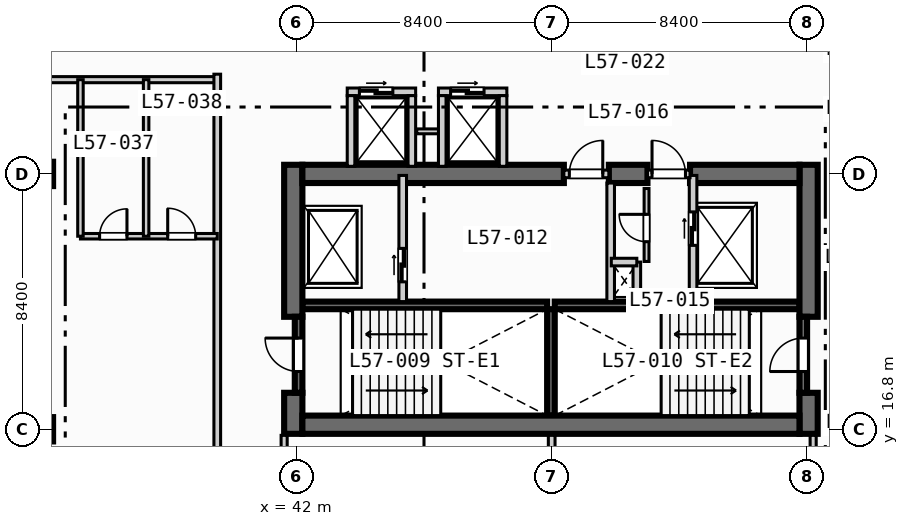
"""IFC4 building model, lengths in metres.
Left out: names, types, materials, properties, quantities, classifications, styles, units other than length and angle.
Written with IfcOpenShell. Run it as: python <this file> out.ifc"""

import sys

from ifc_helpers import new_model, si_unit, direction, frame, frame_2d, origin, origin_2d, place, context, subcontext, project, spatial, rectangle, extrude, element, fill, save


model = new_model("IFC4")
c1 = context("Model", 3, precision=1e-05, world=origin(), true_north=direction((0.0, 1.0)))
c2 = subcontext(c1, "Body", "Model", "MODEL_VIEW")
j1 = project(units=[si_unit("LENGTHUNIT", "METRE"), si_unit("PLANEANGLEUNIT", "RADIAN")], contexts=[c1])
p1 = place(None, origin())
s1 = spatial("IfcSite", under=j1, at=p1, CompositionType="ELEMENT")
p2 = place(p1, origin())
s2 = spatial("IfcBuilding", under=s1, at=p2, CompositionType="ELEMENT")
p3 = place(p2, frame((0.0, 0.0, 234.2)))
s3 = spatial("IfcBuildingStorey", under=s2, at=p3, CompositionType="ELEMENT", Elevation=234.2)
for number, where, z_axis, x_axis in (
    (1, (42.2, 20.875, 0.0), (0.0, 0.0, 1.0), (1.0, 0.0, 0.0)),
    (2, (50.5, 20.875, 0.0), (0.0, 0.0, 1.0), (1.0, 0.0, 0.0)),
):
    element("IfcWall", number, at=place(p3, frame(where, z_axis=z_axis, x_axis=x_axis)), inside=s3, PredefinedType="SOLIDWALL", context=c2, shape_type="SweptSolid", body=[
        extrude(rectangle(XDim=8.05, YDim=0.25, at=frame_2d((4.025, 0.0))), origin(), (0.0, 0.0, 1.0), 3.47),
    ])
p4 = place(p3, frame((50.375, 17.25, 0.0), z_axis=(0.0, 0.0, 1.0), x_axis=(0.0, 1.0, 0.0)))
e3 = element("IfcWall", 3, at=p4, inside=s3, PredefinedType="SOLIDWALL", context=c2, shape_type="SweptSolid", body=[
    extrude(rectangle(XDim=3.5, YDim=0.25, at=frame_2d((1.75, 0.0))), origin(), (0.0, 0.0, 1.0), 3.47),
])
p5 = place(p3, frame((41.9, 16.65, 0.0), z_axis=(0.0, 0.0, 1.0), x_axis=(0.0, 1.0, 0.0)))
e4 = element("IfcWall", 4, at=p5, inside=s3, PredefinedType="SHEAR", context=c2, shape_type="SweptSolid", body=[
    extrude(rectangle(XDim=1.35, YDim=0.6, at=frame_2d((0.675, 0.0))), origin(), (0.0, 0.0, 1.0), 3.47),
])
p6 = place(p3, frame((41.9, 20.5, 0.0), z_axis=(0.0, 0.0, 1.0), x_axis=(0.0, 1.0, 0.0)))
e5 = element("IfcWall", 5, at=p6, inside=s3, PredefinedType="SHEAR", context=c2, shape_type="SweptSolid", body=[
    extrude(rectangle(XDim=5.0, YDim=0.6, at=frame_2d((2.5, 0.0))), origin(), (0.0, 0.0, 1.0), 3.47),
])
p7 = place(p3, frame((58.85, 16.65, 0.0), z_axis=(0.0, 0.0, 1.0), x_axis=(0.0, 1.0, 0.0)))
e6 = element("IfcWall", 6, at=p7, inside=s3, PredefinedType="SHEAR", context=c2, shape_type="SweptSolid", body=[
    extrude(rectangle(XDim=1.35, YDim=0.6, at=frame_2d((0.675, 0.0))), origin(), (0.0, 0.0, 1.0), 3.47),
])
p8 = place(p3, frame((58.85, 20.5, 0.0), z_axis=(0.0, 0.0, 1.0), x_axis=(0.0, 1.0, 0.0)))
e7 = element("IfcWall", 7, at=p8, inside=s3, PredefinedType="SHEAR", context=c2, shape_type="SweptSolid", body=[
    extrude(rectangle(XDim=5.0, YDim=0.6, at=frame_2d((2.5, 0.0))), origin(), (0.0, 0.0, 1.0), 3.47),
])
p9 = place(p3, frame((42.2, 16.95, 0.0), z_axis=(0.0, 0.0, 1.0), x_axis=(1.0, 0.0, 0.0)))
e8 = element("IfcWall", 8, at=p9, inside=s3, PredefinedType="SHEAR", context=c2, shape_type="SweptSolid", body=[
    extrude(rectangle(XDim=16.35, YDim=0.6, at=frame_2d((8.175, 0.0))), origin(), (0.0, 0.0, 1.0), 3.47),
])
p10 = place(p3, frame((42.2, 25.2, 0.0), z_axis=(0.0, 0.0, 1.0), x_axis=(1.0, 0.0, 0.0)))
e9 = element("IfcWall", 9, at=p10, inside=s3, PredefinedType="SHEAR", context=c2, shape_type="SweptSolid", body=[
    extrude(rectangle(XDim=8.6, YDim=0.6, at=frame_2d((4.3, 0.0))), origin(), (0.0, 0.0, 1.0), 3.47),
])
p11 = place(p3, frame((52.28, 25.2, 0.0), z_axis=(0.0, 0.0, 1.0), x_axis=(1.0, 0.0, 0.0)))
e10 = element("IfcWall", 10, at=p11, inside=s3, PredefinedType="SHEAR", context=c2, shape_type="SweptSolid", body=[
    extrude(rectangle(XDim=1.27, YDim=0.6, at=frame_2d((0.635, 0.0))), origin(), (0.0, 0.0, 1.0), 3.47),
])
p12 = place(p3, frame((54.95, 25.2, 0.0), z_axis=(0.0, 0.0, 1.0), x_axis=(1.0, 0.0, 0.0)))
e11 = element("IfcWall", 11, at=p12, inside=s3, PredefinedType="SHEAR", context=c2, shape_type="SweptSolid", body=[
    extrude(rectangle(XDim=3.6, YDim=0.6, at=frame_2d((1.8, 0.0))), origin(), (0.0, 0.0, 1.0), 3.47),
])
for number, where, z_axis, x_axis in (
    (12, (33.6, 16.8, 0.0), (0.0, 0.0, 1.0), (1.0, 0.0, 0.0)),
    (13, (33.6, 25.2, 0.0), (0.0, 0.0, 1.0), (1.0, 0.0, 0.0)),
):
    element("IfcColumn", number, at=place(p3, frame(where, z_axis=z_axis, x_axis=x_axis)), inside=s3, PredefinedType="COLUMN", context=c2, shape_type="SweptSolid", body=[
        extrude(rectangle(XDim=0.8, YDim=0.8, at=origin_2d()), origin(), (0.0, 0.0, 1.0), 3.7),
    ])
p13 = place(p3, frame((42.075, 18.0, 0.0), z_axis=(0.0, 0.0, 1.0), x_axis=(0.0, 1.0, 0.0)))
e14 = element("IfcWall", 14, at=p13, inside=s3, PredefinedType="SOLIDWALL", context=c2, shape_type="SweptSolid", body=[
    extrude(rectangle(XDim=2.5, YDim=0.25, at=frame_2d((1.25, 0.0))), origin(), (0.0, 0.0, 1.0), 3.47),
])
p14 = place(p13, frame((0.7, 0.0, 0.0)))
e15 = element("IfcOpeningElement", 15, at=p14, cuts=e14, PredefinedType="OPENING", context=c2, shape_type="SweptSolid", body=[
    extrude(rectangle(XDim=1.1, YDim=2.15, at=frame_2d((0.55, 1.075))), frame((0.0, 0.135, 0.0), z_axis=(0.0, -1.0, 0.0), x_axis=(1.0, 0.0, 0.0)), (0.0, 0.0, 1.0), 0.27),
])
p15 = place(p3, frame((58.675, 18.0, 0.0), z_axis=(0.0, 0.0, 1.0), x_axis=(0.0, 1.0, 0.0)))
e16 = element("IfcWall", 16, at=p15, inside=s3, PredefinedType="SOLIDWALL", context=c2, shape_type="SweptSolid", body=[
    extrude(rectangle(XDim=2.5, YDim=0.25, at=frame_2d((1.25, 0.0))), origin(), (0.0, 0.0, 1.0), 3.47),
])
p16 = place(p15, frame((0.7, 0.0, 0.0)))
e17 = element("IfcOpeningElement", 17, at=p16, cuts=e16, PredefinedType="OPENING", context=c2, shape_type="SweptSolid", body=[
    extrude(rectangle(XDim=1.1, YDim=2.15, at=frame_2d((0.55, 1.075))), frame((0.0, 0.135, 0.0), z_axis=(0.0, -1.0, 0.0), x_axis=(1.0, 0.0, 0.0)), (0.0, 0.0, 1.0), 0.27),
])
p17 = place(p3, frame((45.5, 21.0, 0.0), z_axis=(0.0, 0.0, 1.0), x_axis=(0.0, 1.0, 0.0)))
e18 = element("IfcWall", 18, at=p17, inside=s3, PredefinedType="SOLIDWALL", context=c2, shape_type="SweptSolid", body=[
    extrude(rectangle(XDim=4.15, YDim=0.25, at=frame_2d((2.075, 0.0))), origin(), (0.0, 0.0, 1.0), 3.47),
])
p18 = place(p17, frame((0.65, 0.0, 0.0)))
e19 = element("IfcOpeningElement", 19, at=p18, cuts=e18, PredefinedType="OPENING", context=c2, shape_type="SweptSolid", body=[
    extrude(rectangle(XDim=1.1, YDim=2.15, at=frame_2d((0.55, 1.075))), frame((0.0, 0.135, 0.0), z_axis=(0.0, -1.0, 0.0), x_axis=(1.0, 0.0, 0.0)), (0.0, 0.0, 1.0), 0.27),
])
p19 = place(p3, frame((50.8, 25.2, 0.0), z_axis=(0.0, 0.0, 1.0), x_axis=(1.0, 0.0, 0.0)))
e20 = element("IfcWall", 20, at=p19, inside=s3, PredefinedType="SOLIDWALL", context=c2, shape_type="SweptSolid", body=[
    extrude(rectangle(XDim=1.48, YDim=0.25, at=frame_2d((0.74, 0.0))), origin(), (0.0, 0.0, 1.0), 3.47),
])
p20 = place(p19, frame((0.18, 0.0, 0.0)))
e21 = element("IfcOpeningElement", 21, at=p20, cuts=e20, PredefinedType="OPENING", context=c2, shape_type="SweptSolid", body=[
    extrude(rectangle(XDim=1.1, YDim=2.15, at=frame_2d((0.55, 1.075))), frame((0.0, 0.135, 0.0), z_axis=(0.0, -1.0, 0.0), x_axis=(1.0, 0.0, 0.0)), (0.0, 0.0, 1.0), 0.27),
])
p21 = place(p3, frame((52.34, 21.0, 0.0), z_axis=(0.0, 0.0, 1.0), x_axis=(0.0, 1.0, 0.0)))
e22 = element("IfcWall", 22, at=p21, inside=s3, PredefinedType="SOLIDWALL", context=c2, shape_type="SweptSolid", body=[
    extrude(rectangle(XDim=3.9, YDim=0.25, at=frame_2d((1.95, 0.0))), origin(), (0.0, 0.0, 1.0), 3.47),
])
p22 = place(p3, frame((55.05, 21.0, 0.0), z_axis=(0.0, 0.0, 1.0), x_axis=(0.0, 1.0, 0.0)))
e23 = element("IfcWall", 23, at=p22, inside=s3, PredefinedType="SOLIDWALL", context=c2, shape_type="SweptSolid", body=[
    extrude(rectangle(XDim=4.15, YDim=0.25, at=frame_2d((2.075, 0.0))), origin(), (0.0, 0.0, 1.0), 3.47),
])
p23 = place(p22, frame((1.85, 0.0, 0.0)))
e24 = element("IfcOpeningElement", 24, at=p23, cuts=e23, PredefinedType="OPENING", context=c2, shape_type="SweptSolid", body=[
    extrude(rectangle(XDim=1.1, YDim=2.15, at=frame_2d((0.55, 1.075))), frame((0.0, 0.135, 0.0), z_axis=(0.0, -1.0, 0.0), x_axis=(1.0, 0.0, 0.0)), (0.0, 0.0, 1.0), 0.27),
])
p24 = place(p3, frame((53.55, 25.2, 0.0), z_axis=(0.0, 0.0, 1.0), x_axis=(1.0, 0.0, 0.0)))
e25 = element("IfcWall", 25, at=p24, inside=s3, PredefinedType="SOLIDWALL", context=c2, shape_type="SweptSolid", body=[
    extrude(rectangle(XDim=1.4, YDim=0.25, at=frame_2d((0.7, 0.0))), origin(), (0.0, 0.0, 1.0), 3.47),
])
p25 = place(p24, frame((0.15, 0.0, 0.0)))
e26 = element("IfcOpeningElement", 26, at=p25, cuts=e25, PredefinedType="OPENING", context=c2, shape_type="SweptSolid", body=[
    extrude(rectangle(XDim=1.1, YDim=2.15, at=frame_2d((0.55, 1.075))), frame((0.0, 0.135, 0.0), z_axis=(0.0, -1.0, 0.0), x_axis=(1.0, 0.0, 0.0)), (0.0, 0.0, 1.0), 0.27),
])
p26 = place(p3, frame((53.2, 21.0, 0.0), z_axis=(0.0, 0.0, 1.0), x_axis=(0.0, 1.0, 0.0)))
e27 = element("IfcWall", 27, at=p26, inside=s3, PredefinedType="SOLIDWALL", context=c2, shape_type="SweptSolid", body=[
    extrude(rectangle(XDim=1.3, YDim=0.25, at=frame_2d((0.65, 0.0))), origin(), (0.0, 0.0, 1.0), 3.47),
])
p27 = place(p3, frame((52.36, 22.3, 0.0), z_axis=(0.0, 0.0, 1.0), x_axis=(1.0, 0.0, 0.0)))
e28 = element("IfcWall", 28, at=p27, inside=s3, PredefinedType="SOLIDWALL", context=c2, shape_type="SweptSolid", body=[
    extrude(rectangle(XDim=0.84, YDim=0.25, at=frame_2d((0.42, 0.0))), origin(), (0.0, 0.0, 1.0), 3.47),
])
p28 = place(p3, frame((53.52, 22.32, 0.0), z_axis=(0.0, 0.0, 1.0), x_axis=(0.0, 1.0, 0.0)))
e29 = element("IfcWall", 29, at=p28, inside=s3, PredefinedType="PARTITIONING", context=c2, shape_type="SweptSolid", body=[
    extrude(rectangle(XDim=2.4, YDim=0.16, at=frame_2d((1.2, 0.0))), origin(), (0.0, 0.0, 1.0), 3.47),
])
p29 = place(p28, frame((0.65, 0.0, 0.0)))
e30 = element("IfcOpeningElement", 30, at=p29, cuts=e29, PredefinedType="OPENING", context=c2, shape_type="SweptSolid", body=[
    extrude(rectangle(XDim=0.9, YDim=2.1, at=frame_2d((0.45, 1.05))), frame((0.0, 0.09, 0.0), z_axis=(0.0, -1.0, 0.0), x_axis=(1.0, 0.0, 0.0)), (0.0, 0.0, 1.0), 0.18),
])
p30 = place(p3, frame((43.675, 27.9, 0.0), z_axis=(0.0, 0.0, 1.0), x_axis=(1.0, 0.0, 0.0)))
e31 = element("IfcWall", 31, at=p30, inside=s3, PredefinedType="SOLIDWALL", context=c2, shape_type="SweptSolid", body=[
    extrude(rectangle(XDim=2.25, YDim=0.25, at=frame_2d((1.125, 0.0))), origin(), (0.0, 0.0, 1.0), 3.47),
])
p31 = place(p30, frame((0.4, 0.0, 0.0)))
e32 = element("IfcOpeningElement", 32, at=p31, cuts=e31, PredefinedType="OPENING", context=c2, shape_type="SweptSolid", body=[
    extrude(rectangle(XDim=1.1, YDim=2.15, at=frame_2d((0.55, 1.075))), frame((0.0, 0.135, 0.0), z_axis=(0.0, -1.0, 0.0), x_axis=(1.0, 0.0, 0.0)), (0.0, 0.0, 1.0), 0.27),
])
for number, where, z_axis, x_axis in (
    (33, (43.8, 25.45, 0.0), (0.0, 0.0, 1.0), (0.0, 1.0, 0.0)),
    (34, (45.8, 25.45, 0.0), (0.0, 0.0, 1.0), (0.0, 1.0, 0.0)),
):
    element("IfcWall", number, at=place(p3, frame(where, z_axis=z_axis, x_axis=x_axis)), inside=s3, PredefinedType="SOLIDWALL", context=c2, shape_type="SweptSolid", body=[
        extrude(rectangle(XDim=2.325, YDim=0.25, at=frame_2d((1.163, 0.0))), origin(), (0.0, 0.0, 1.0), 3.47),
    ])
p32 = place(p3, frame((45.96, 26.6, 0.0), z_axis=(0.0, 0.0, 1.0), x_axis=(1.0, 0.0, 0.0)))
e35 = element("IfcWall", 35, at=p32, inside=s3, PredefinedType="PARTITIONING", context=c2, shape_type="SweptSolid", body=[
    extrude(rectangle(XDim=0.88, YDim=0.16, at=frame_2d((0.44, 0.0))), origin(), (0.0, 0.0, 1.0), 3.47),
])
p33 = place(p3, frame((46.675, 27.9, 0.0), z_axis=(0.0, 0.0, 1.0), x_axis=(1.0, 0.0, 0.0)))
e36 = element("IfcWall", 36, at=p33, inside=s3, PredefinedType="SOLIDWALL", context=c2, shape_type="SweptSolid", body=[
    extrude(rectangle(XDim=2.25, YDim=0.25, at=frame_2d((1.125, 0.0))), origin(), (0.0, 0.0, 1.0), 3.47),
])
p34 = place(p33, frame((0.4, 0.0, 0.0)))
e37 = element("IfcOpeningElement", 37, at=p34, cuts=e36, PredefinedType="OPENING", context=c2, shape_type="SweptSolid", body=[
    extrude(rectangle(XDim=1.1, YDim=2.15, at=frame_2d((0.55, 1.075))), frame((0.0, 0.135, 0.0), z_axis=(0.0, -1.0, 0.0), x_axis=(1.0, 0.0, 0.0)), (0.0, 0.0, 1.0), 0.27),
])
for number, where, z_axis, x_axis in (
    (38, (46.8, 25.45, 0.0), (0.0, 0.0, 1.0), (0.0, 1.0, 0.0)),
    (39, (48.8, 25.45, 0.0), (0.0, 0.0, 1.0), (0.0, 1.0, 0.0)),
):
    element("IfcWall", number, at=place(p3, frame(where, z_axis=z_axis, x_axis=x_axis)), inside=s3, PredefinedType="SOLIDWALL", context=c2, shape_type="SweptSolid", body=[
        extrude(rectangle(XDim=2.325, YDim=0.25, at=frame_2d((1.163, 0.0))), origin(), (0.0, 0.0, 1.0), 3.47),
    ])
p35 = place(p3, frame((41.6, 8.65, 0.0), z_axis=(0.0, 0.0, 1.0), x_axis=(0.0, 1.0, 0.0)))
e40 = element("IfcWall", 40, at=p35, inside=s3, PredefinedType="PARTITIONING", context=c2, shape_type="SweptSolid", body=[
    extrude(rectangle(XDim=7.95, YDim=0.2, at=frame_2d((3.975, 0.0))), origin(), (0.0, 0.0, 1.0), 3.47),
])
p36 = place(p35, frame((2.2, 0.0, 0.0)))
e41 = element("IfcOpeningElement", 41, at=p36, cuts=e40, PredefinedType="OPENING", context=c2, shape_type="SweptSolid", body=[
    extrude(rectangle(XDim=0.92, YDim=2.1, at=frame_2d((0.46, 1.05))), frame((0.0, 0.11, 0.0), z_axis=(0.0, -1.0, 0.0), x_axis=(1.0, 0.0, 0.0)), (0.0, 0.0, 1.0), 0.22),
])
p37 = place(p3, frame((59.0, 8.65, 0.0), z_axis=(0.0, 0.0, 1.0), x_axis=(0.0, 1.0, 0.0)))
e42 = element("IfcWall", 42, at=p37, inside=s3, PredefinedType="PARTITIONING", context=c2, shape_type="SweptSolid", body=[
    extrude(rectangle(XDim=7.95, YDim=0.2, at=frame_2d((3.975, 0.0))), origin(), (0.0, 0.0, 1.0), 2.82),
])
p38 = place(p37, frame((2.2, 0.0, 0.0)))
e43 = element("IfcOpeningElement", 43, at=p38, cuts=e42, PredefinedType="OPENING", context=c2, shape_type="SweptSolid", body=[
    extrude(rectangle(XDim=0.92, YDim=2.1, at=frame_2d((0.46, 1.05))), frame((0.0, 0.11, 0.0), z_axis=(0.0, -1.0, 0.0), x_axis=(1.0, 0.0, 0.0)), (0.0, 0.0, 1.0), 0.22),
])
p39 = place(p3, frame((50.4, 8.65, 0.0), z_axis=(0.0, 0.0, 1.0), x_axis=(0.0, 1.0, 0.0)))
e44 = element("IfcWall", 44, at=p39, inside=s3, PredefinedType="PARTITIONING", context=c2, shape_type="SweptSolid", body=[
    extrude(rectangle(XDim=7.95, YDim=0.22, at=frame_2d((3.975, 0.0))), origin(), (0.0, 0.0, 1.0), 3.116),
])
p40 = place(p3, frame((11.8, 28.3, 0.0), z_axis=(0.0, 0.0, 1.0), x_axis=(1.0, 0.0, 0.0)))
e45 = element("IfcWall", 45, at=p40, inside=s3, PredefinedType="PARTITIONING", context=c2, shape_type="SweptSolid", body=[
    extrude(rectangle(XDim=27.6, YDim=0.2, at=frame_2d((13.8, 0.0))), origin(), (0.0, 0.0, 1.0), 3.47),
])
p41 = place(p40, frame((1.67, 0.0, 0.0)))
e46 = element("IfcOpeningElement", 46, at=p41, cuts=e45, PredefinedType="OPENING", context=c2, shape_type="SweptSolid", body=[
    extrude(rectangle(XDim=1.0, YDim=2.15, at=frame_2d((0.5, 1.075))), frame((0.0, 0.11, 0.0), z_axis=(0.0, -1.0, 0.0), x_axis=(1.0, 0.0, 0.0)), (0.0, 0.0, 1.0), 0.22),
])
p42 = place(p40, frame((10.57, 0.0, 0.0)))
e47 = element("IfcOpeningElement", 47, at=p42, cuts=e45, PredefinedType="OPENING", context=c2, shape_type="SweptSolid", body=[
    extrude(rectangle(XDim=1.0, YDim=2.15, at=frame_2d((0.5, 1.075))), frame((0.0, 0.11, 0.0), z_axis=(0.0, -1.0, 0.0), x_axis=(1.0, 0.0, 0.0)), (0.0, 0.0, 1.0), 0.22),
])
p43 = place(p40, frame((19.97, 0.0, 0.0)))
e48 = element("IfcOpeningElement", 48, at=p43, cuts=e45, PredefinedType="OPENING", context=c2, shape_type="SweptSolid", body=[
    extrude(rectangle(XDim=1.0, YDim=2.15, at=frame_2d((0.5, 1.075))), frame((0.0, 0.11, 0.0), z_axis=(0.0, -1.0, 0.0), x_axis=(1.0, 0.0, 0.0)), (0.0, 0.0, 1.0), 0.22),
])
p44 = place(p3, frame((39.4, 8.6, 0.0), z_axis=(0.0, 0.0, 1.0), x_axis=(0.0, 1.0, 0.0)))
e49 = element("IfcWall", 49, at=p44, inside=s3, PredefinedType="PARTITIONING", context=c2, shape_type="SweptSolid", body=[
    extrude(rectangle(XDim=19.88, YDim=0.22, at=frame_2d((9.94, 0.0))), origin(), (0.0, 0.0, 1.0), 3.47),
])
p45 = place(p3, frame((34.9, 23.15, 0.0), z_axis=(0.0, 0.0, 1.0), x_axis=(1.0, 0.0, 0.0)))
e50 = element("IfcWall", 50, at=p45, inside=s3, PredefinedType="PLUMBINGWALL", context=c2, shape_type="SweptSolid", body=[
    extrude(rectangle(XDim=4.5, YDim=0.18, at=frame_2d((2.25, 0.0))), origin(), (0.0, 0.0, 1.0), 3.47),
])
p46 = place(p45, frame((0.63, 0.0, 0.0)))
e51 = element("IfcOpeningElement", 51, at=p46, cuts=e50, PredefinedType="OPENING", context=c2, shape_type="SweptSolid", body=[
    extrude(rectangle(XDim=0.9, YDim=2.1, at=frame_2d((0.45, 1.05))), frame((0.0, 0.1, 0.0), z_axis=(0.0, -1.0, 0.0), x_axis=(1.0, 0.0, 0.0)), (0.0, 0.0, 1.0), 0.2),
])
p47 = place(p45, frame((2.87, 0.0, 0.0)))
e52 = element("IfcOpeningElement", 52, at=p47, cuts=e50, PredefinedType="OPENING", context=c2, shape_type="SweptSolid", body=[
    extrude(rectangle(XDim=0.92, YDim=2.1, at=frame_2d((0.46, 1.05))), frame((0.0, 0.1, 0.0), z_axis=(0.0, -1.0, 0.0), x_axis=(1.0, 0.0, 0.0)), (0.0, 0.0, 1.0), 0.2),
])
for number, where, z_axis, x_axis in (
    (53, (34.9, 23.15, 0.0), (0.0, 0.0, 1.0), (0.0, 1.0, 0.0)),
    (54, (37.06, 23.15, 0.0), (0.0, 0.0, 1.0), (0.0, 1.0, 0.0)),
):
    element("IfcWall", number, at=place(p3, frame(where, z_axis=z_axis, x_axis=x_axis)), inside=s3, PredefinedType="PLUMBINGWALL", context=c2, shape_type="SweptSolid", body=[
        extrude(rectangle(XDim=5.15, YDim=0.18, at=frame_2d((2.575, 0.0))), origin(), (0.0, 0.0, 1.0), 3.47),
    ])
p48 = place(p14, origin())
e55 = element("IfcDoor", 55, at=p48, inside=s3, OperationType="SINGLE_SWING_RIGHT", PredefinedType="DOOR", context=c2, shape_type="SweptSolid", body=[
    extrude(rectangle(XDim=1.1, YDim=2.15, at=frame_2d((0.55, 1.075))), frame((0.0, 0.025, 0.0), z_axis=(0.0, -1.0, 0.0), x_axis=(1.0, 0.0, 0.0)), (0.0, 0.0, 1.0), 0.05),
])
fill(e15, e55)
p49 = place(p16, origin())
e56 = element("IfcDoor", 56, at=p49, inside=s3, OperationType="SINGLE_SWING_LEFT", PredefinedType="DOOR", context=c2, shape_type="SweptSolid", body=[
    extrude(rectangle(XDim=1.1, YDim=2.15, at=frame_2d((0.55, 1.075))), frame((0.0, 0.025, 0.0), z_axis=(0.0, -1.0, 0.0), x_axis=(1.0, 0.0, 0.0)), (0.0, 0.0, 1.0), 0.05),
])
fill(e17, e56)
p50 = place(p18, origin())
e57 = element("IfcDoor", 57, at=p50, inside=s3, OperationType="SLIDING_TO_LEFT", PredefinedType="DOOR", context=c2, shape_type="SweptSolid", body=[
    extrude(rectangle(XDim=1.1, YDim=2.15, at=frame_2d((0.55, 1.075))), frame((0.0, 0.025, 0.0), z_axis=(0.0, -1.0, 0.0), x_axis=(1.0, 0.0, 0.0)), (0.0, 0.0, 1.0), 0.05),
])
fill(e19, e57)
p51 = place(p20, origin())
e58 = element("IfcDoor", 58, at=p51, inside=s3, OperationType="SINGLE_SWING_RIGHT", PredefinedType="DOOR", context=c2, shape_type="SweptSolid", body=[
    extrude(rectangle(XDim=1.1, YDim=2.15, at=frame_2d((0.55, 1.075))), frame((0.0, 0.025, 0.0), z_axis=(0.0, -1.0, 0.0), x_axis=(1.0, 0.0, 0.0)), (0.0, 0.0, 1.0), 0.05),
])
fill(e21, e58)
p52 = place(p23, origin())
e59 = element("IfcDoor", 59, at=p52, inside=s3, OperationType="SLIDING_TO_LEFT", PredefinedType="DOOR", context=c2, shape_type="SweptSolid", body=[
    extrude(rectangle(XDim=1.1, YDim=2.15, at=frame_2d((0.55, 1.075))), frame((0.0, 0.025, 0.0), z_axis=(0.0, -1.0, 0.0), x_axis=(1.0, 0.0, 0.0)), (0.0, 0.0, 1.0), 0.05),
])
fill(e24, e59)
p53 = place(p25, origin())
e60 = element("IfcDoor", 60, at=p53, inside=s3, OperationType="SINGLE_SWING_LEFT", PredefinedType="DOOR", context=c2, shape_type="SweptSolid", body=[
    extrude(rectangle(XDim=1.1, YDim=2.15, at=frame_2d((0.55, 1.075))), frame((0.0, 0.025, 0.0), z_axis=(0.0, -1.0, 0.0), x_axis=(1.0, 0.0, 0.0)), (0.0, 0.0, 1.0), 0.05),
])
fill(e26, e60)
p54 = place(p29, origin())
e61 = element("IfcDoor", 61, at=p54, inside=s3, OperationType="SINGLE_SWING_RIGHT", PredefinedType="DOOR", context=c2, shape_type="SweptSolid", body=[
    extrude(rectangle(XDim=0.9, YDim=2.1, at=frame_2d((0.45, 1.05))), frame((0.0, 0.025, 0.0), z_axis=(0.0, -1.0, 0.0), x_axis=(1.0, 0.0, 0.0)), (0.0, 0.0, 1.0), 0.05),
])
fill(e30, e61)
p55 = place(p31, origin())
e62 = element("IfcDoor", 62, at=p55, inside=s3, OperationType="SLIDING_TO_LEFT", PredefinedType="DOOR", context=c2, shape_type="SweptSolid", body=[
    extrude(rectangle(XDim=1.1, YDim=2.15, at=frame_2d((0.55, 1.075))), frame((0.0, 0.025, 0.0), z_axis=(0.0, -1.0, 0.0), x_axis=(1.0, 0.0, 0.0)), (0.0, 0.0, 1.0), 0.05),
])
fill(e32, e62)
p56 = place(p34, origin())
e63 = element("IfcDoor", 63, at=p56, inside=s3, OperationType="SLIDING_TO_LEFT", PredefinedType="DOOR", context=c2, shape_type="SweptSolid", body=[
    extrude(rectangle(XDim=1.1, YDim=2.15, at=frame_2d((0.55, 1.075))), frame((0.0, 0.025, 0.0), z_axis=(0.0, -1.0, 0.0), x_axis=(1.0, 0.0, 0.0)), (0.0, 0.0, 1.0), 0.05),
])
fill(e37, e63)
p57 = place(p46, origin())
e64 = element("IfcDoor", 64, at=p57, inside=s3, OperationType="SINGLE_SWING_RIGHT", PredefinedType="DOOR", context=c2, shape_type="SweptSolid", body=[
    extrude(rectangle(XDim=0.9, YDim=2.1, at=frame_2d((0.45, 1.05))), frame((0.0, 0.025, 0.0), z_axis=(0.0, -1.0, 0.0), x_axis=(1.0, 0.0, 0.0)), (0.0, 0.0, 1.0), 0.05),
])
fill(e51, e64)
p58 = place(p47, origin())
e65 = element("IfcDoor", 65, at=p58, inside=s3, OperationType="SINGLE_SWING_LEFT", PredefinedType="DOOR", context=c2, shape_type="SweptSolid", body=[
    extrude(rectangle(XDim=0.92, YDim=2.1, at=frame_2d((0.46, 1.05))), frame((0.0, 0.025, 0.0), z_axis=(0.0, -1.0, 0.0), x_axis=(1.0, 0.0, 0.0)), (0.0, 0.0, 1.0), 0.05),
])
fill(e52, e65)
save(model, sys.argv[1])
